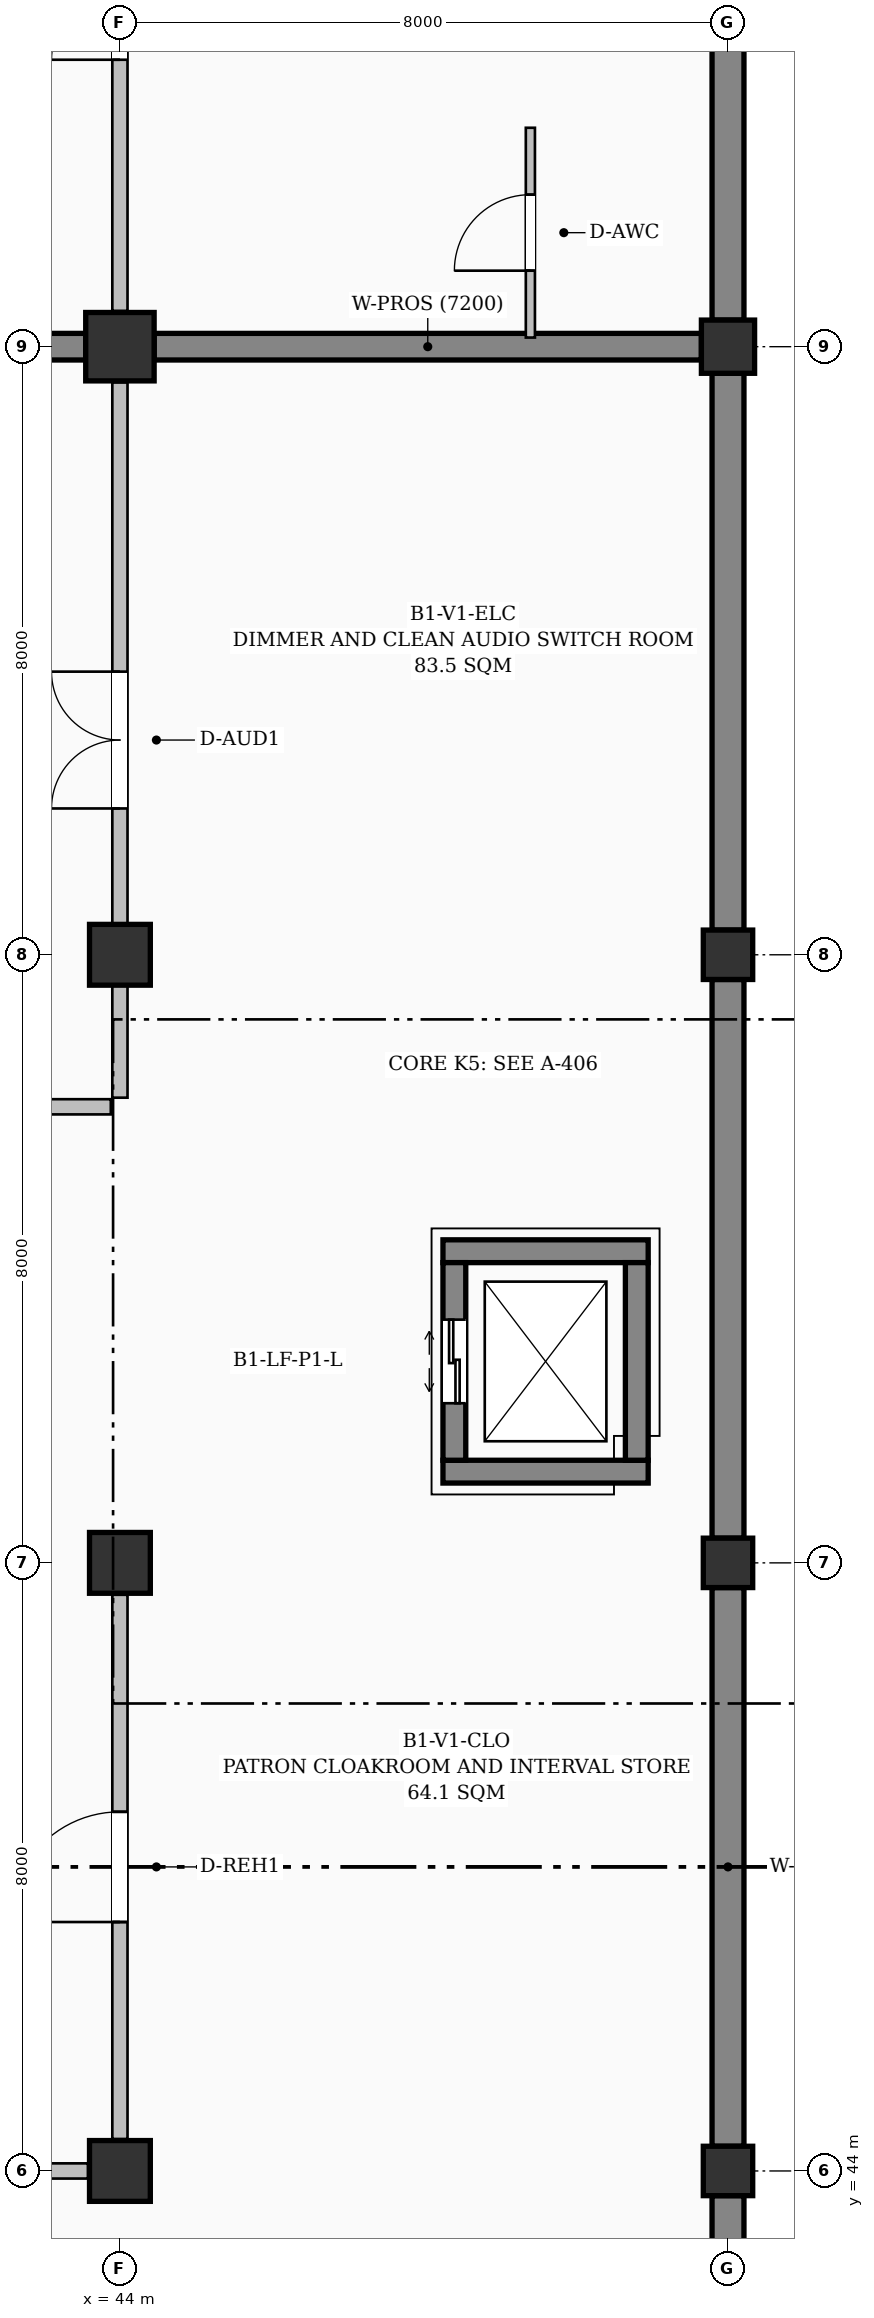
"""IFC4 building model, lengths in metres.
Left out: names, types, materials, properties, quantities, classifications, styles, units other than length and angle.
Written with IfcOpenShell. Run it as: python <this file> out.ifc"""

import sys

from ifc_helpers import new_model, si_unit, direction, frame, frame_2d, origin, origin_2d, place, context, subcontext, project, spatial, rectangle, extrude, element, fill, save


model = new_model("IFC4")
c1 = context("Model", 3, precision=1e-05, world=origin(), true_north=direction((0.0, 1.0)))
c2 = subcontext(c1, "Body", "Model", "MODEL_VIEW")
j1 = project(units=[si_unit("LENGTHUNIT", "METRE"), si_unit("PLANEANGLEUNIT", "RADIAN")], contexts=[c1])
p1 = place(None, origin())
s1 = spatial("IfcSite", under=j1, at=p1, CompositionType="ELEMENT")
p2 = place(p1, origin())
s2 = spatial("IfcBuilding", under=s1, at=p2, CompositionType="ELEMENT")
p3 = place(p2, frame((0.0, 0.0, -4.8)))
s3 = spatial("IfcBuildingStorey", under=s2, at=p3, CompositionType="ELEMENT", Elevation=-4.8)
for number, where, z_axis, x_axis in (
    (1, (44.0, 44.0, -0.38), (0.0, 0.0, 1.0), (1.0, 0.0, 0.0)),
    (2, (44.0, 52.0, -0.38), (0.0, 0.0, 1.0), (1.0, 0.0, 0.0)),
    (3, (44.0, 60.0, -0.38), (0.0, 0.0, 1.0), (1.0, 0.0, 0.0)),
):
    element("IfcColumn", number, at=place(p3, frame(where, z_axis=z_axis, x_axis=x_axis)), inside=s3, PredefinedType="COLUMN", context=c2, shape_type="SweptSolid", body=[
        extrude(rectangle(XDim=0.8, YDim=0.8, at=origin_2d()), origin(), (0.0, 0.0, 1.0), 5.18),
    ])
p4 = place(p3, frame((44.0, 68.0, -0.38), z_axis=(0.0, 0.0, 1.0), x_axis=(1.0, 0.0, 0.0)))
e4 = element("IfcColumn", 4, at=p4, inside=s3, PredefinedType="COLUMN", context=c2, shape_type="SweptSolid", body=[
    extrude(rectangle(XDim=0.9, YDim=0.9, at=origin_2d()), origin(), (0.0, 0.0, 1.0), 5.18),
])
for number, where, z_axis, x_axis in (
    (5, (52.0, 44.0, -0.38), (0.0, 0.0, 1.0), (1.0, 0.0, 0.0)),
    (6, (52.0, 52.0, -0.38), (0.0, 0.0, 1.0), (1.0, 0.0, 0.0)),
    (7, (52.0, 60.0, -0.38), (0.0, 0.0, 1.0), (1.0, 0.0, 0.0)),
):
    element("IfcColumn", number, at=place(p3, frame(where, z_axis=z_axis, x_axis=x_axis)), inside=s3, PredefinedType="COLUMN", context=c2, shape_type="SweptSolid", body=[
        extrude(rectangle(XDim=0.65, YDim=0.65, at=origin_2d()), origin(), (0.0, 0.0, 1.0), 5.18),
    ])
p5 = place(p3, frame((52.0, 68.0, -0.38), z_axis=(0.0, 0.0, 1.0), x_axis=(1.0, 0.0, 0.0)))
e8 = element("IfcColumn", 8, at=p5, inside=s3, PredefinedType="COLUMN", context=c2, shape_type="SweptSolid", body=[
    extrude(rectangle(XDim=0.7, YDim=0.7, at=origin_2d()), origin(), (0.0, 0.0, 1.0), 5.18),
])
p6 = place(p3, frame((52.0, 67.65, 0.0), z_axis=(0.0, 0.0, 1.0), x_axis=(0.0, -1.0, 0.0)))
e9 = element("IfcWall", 9, at=p6, inside=s3, PredefinedType="USERDEFINED", context=c2, shape_type="SweptSolid", body=[
    extrude(rectangle(XDim=7.325, YDim=0.42, at=frame_2d((3.663, 0.0))), origin(), (0.0, 0.0, 1.0), 3.85),
])
for number, where, z_axis, x_axis in (
    (10, (52.0, 59.675, 0.0), (0.0, 0.0, 1.0), (0.0, -1.0, 0.0)),
    (11, (52.0, 51.675, 0.0), (0.0, 0.0, 1.0), (0.0, -1.0, 0.0)),
    (12, (52.0, 43.675, 0.0), (0.0, 0.0, 1.0), (0.0, -1.0, 0.0)),
):
    element("IfcWall", number, at=place(p3, frame(where, z_axis=z_axis, x_axis=x_axis)), inside=s3, PredefinedType="USERDEFINED", context=c2, shape_type="SweptSolid", body=[
        extrude(rectangle(XDim=7.35, YDim=0.42, at=frame_2d((3.675, 0.0))), origin(), (0.0, 0.0, 1.0), 3.85),
    ])
p7 = place(p3, frame((52.0, 75.65, 0.0), z_axis=(0.0, 0.0, 1.0), x_axis=(0.0, -1.0, 0.0)))
e13 = element("IfcWall", 13, at=p7, inside=s3, PredefinedType="USERDEFINED", context=c2, shape_type="SweptSolid", body=[
    extrude(rectangle(XDim=7.3, YDim=0.42, at=frame_2d((3.65, 0.0))), origin(), (0.0, 0.0, 1.0), 3.85),
])
p8 = place(p3, frame((36.45, 68.0, 0.0), z_axis=(0.0, 0.0, 1.0), x_axis=(1.0, 0.0, 0.0)))
e14 = element("IfcWall", 14, at=p8, inside=s3, PredefinedType="SHEAR", context=c2, shape_type="SweptSolid", body=[
    extrude(rectangle(XDim=7.1, YDim=0.35, at=frame_2d((3.55, 0.0))), origin(), (0.0, 0.0, 1.0), 4.5),
])
p9 = place(p3, frame((44.45, 68.0, 0.0), z_axis=(0.0, 0.0, 1.0), x_axis=(1.0, 0.0, 0.0)))
e15 = element("IfcWall", 15, at=p9, inside=s3, PredefinedType="SHEAR", context=c2, shape_type="SweptSolid", body=[
    extrude(rectangle(XDim=7.2, YDim=0.35, at=frame_2d((3.6, 0.0))), origin(), (0.0, 0.0, 1.0), 4.5),
])
for number, where, z_axis, x_axis in (
    (16, (48.25, 53.2, -1.2), (0.0, 0.0, 1.0), (1.0, 0.0, 0.0)),
    (17, (50.95, 56.1, -1.2), (0.0, 0.0, 1.0), (-1.0, 0.0, 0.0)),
):
    element("IfcWall", number, at=place(p3, frame(where, z_axis=z_axis, x_axis=x_axis)), inside=s3, PredefinedType="SHEAR", context=c2, shape_type="SweptSolid", body=[
        extrude(rectangle(XDim=2.7, YDim=0.3, at=frame_2d((1.35, 0.0))), origin(), (0.0, 0.0, 1.0), 5.7),
    ])
p10 = place(p3, frame((48.4, 53.35, -1.2), z_axis=(0.0, 0.0, 1.0), x_axis=(0.0, 1.0, 0.0)))
e18 = element("IfcWall", 18, at=p10, inside=s3, PredefinedType="SHEAR", context=c2, shape_type="SweptSolid", body=[
    extrude(rectangle(XDim=2.6, YDim=0.3, at=frame_2d((1.3, 0.0))), origin(), (0.0, 0.0, 1.0), 5.7),
])
p11 = place(p10, frame((0.75, 0.0, 1.2)))
e19 = element("IfcOpeningElement", 19, at=p11, cuts=e18, PredefinedType="OPENING", context=c2, shape_type="SweptSolid", body=[
    extrude(rectangle(XDim=1.1, YDim=2.15, at=frame_2d((0.55, 1.075))), frame((0.0, 0.16, 0.0), z_axis=(0.0, -1.0, 0.0), x_axis=(1.0, 0.0, 0.0)), (0.0, 0.0, 1.0), 0.32),
])
p12 = place(p3, frame((50.8, 55.95, -1.2), z_axis=(0.0, 0.0, 1.0), x_axis=(0.0, -1.0, 0.0)))
e20 = element("IfcWall", 20, at=p12, inside=s3, PredefinedType="SHEAR", context=c2, shape_type="SweptSolid", body=[
    extrude(rectangle(XDim=2.6, YDim=0.3, at=frame_2d((1.3, 0.0))), origin(), (0.0, 0.0, 1.0), 5.7),
])
p13 = place(p3, frame((28.12, 58.0, 0.0), z_axis=(0.0, 0.0, 1.0), x_axis=(1.0, 0.0, 0.0)))
e21 = element("IfcWall", 21, at=p13, inside=s3, PredefinedType="PARTITIONING", context=c2, shape_type="SweptSolid", body=[
    extrude(rectangle(XDim=15.76, YDim=0.2, at=frame_2d((7.88, 0.0))), origin(), (0.0, 0.0, 1.0), 4.5),
])
p14 = place(p13, frame((6.98, 0.0, 0.0)))
e22 = element("IfcOpeningElement", 22, at=p14, cuts=e21, PredefinedType="OPENING", context=c2, shape_type="SweptSolid", body=[
    extrude(rectangle(XDim=1.8, YDim=2.35, at=frame_2d((0.9, 1.175))), frame((0.0, 0.11, 0.0), z_axis=(0.0, -1.0, 0.0), x_axis=(1.0, 0.0, 0.0)), (0.0, 0.0, 1.0), 0.22),
])
p15 = place(p3, frame((44.0, 58.12, 0.0), z_axis=(0.0, 0.0, 1.0), x_axis=(0.0, 1.0, 0.0)))
e23 = element("IfcWall", 23, at=p15, inside=s3, PredefinedType="PARTITIONING", context=c2, shape_type="SweptSolid", body=[
    extrude(rectangle(XDim=9.41, YDim=0.2, at=frame_2d((4.705, 0.0))), origin(), (0.0, 0.0, 1.0), 3.885),
])
p16 = place(p15, frame((3.805, 0.0, 0.0)))
e24 = element("IfcOpeningElement", 24, at=p16, cuts=e23, PredefinedType="OPENING", context=c2, shape_type="SweptSolid", body=[
    extrude(rectangle(XDim=1.8, YDim=2.35, at=frame_2d((0.9, 1.175))), frame((0.0, 0.11, 0.0), z_axis=(0.0, -1.0, 0.0), x_axis=(1.0, 0.0, 0.0)), (0.0, 0.0, 1.0), 0.22),
])
p17 = place(p3, frame((28.42, 44.0, 0.0), z_axis=(0.0, 0.0, 1.0), x_axis=(1.0, 0.0, 0.0)))
e25 = element("IfcWall", 25, at=p17, inside=s3, PredefinedType="PARTITIONING", context=c2, shape_type="SweptSolid", body=[
    extrude(rectangle(XDim=15.16, YDim=0.2, at=frame_2d((7.58, 0.0))), origin(), (0.0, 0.0, 1.0), 3.635),
])
p18 = place(p17, frame((5.036, 0.0, 0.0)))
e26 = element("IfcOpeningElement", 26, at=p18, cuts=e25, PredefinedType="OPENING", context=c2, shape_type="SweptSolid", body=[
    extrude(rectangle(XDim=1.45, YDim=2.25, at=frame_2d((0.725, 1.125))), frame((0.0, 0.11, 0.0), z_axis=(0.0, -1.0, 0.0), x_axis=(1.0, 0.0, 0.0)), (0.0, 0.0, 1.0), 0.22),
])
p19 = place(p3, frame((44.0, 44.42, 0.0), z_axis=(0.0, 0.0, 1.0), x_axis=(0.0, 1.0, 0.0)))
e27 = element("IfcWall", 27, at=p19, inside=s3, PredefinedType="PARTITIONING", context=c2, shape_type="SweptSolid", body=[
    extrude(rectangle(XDim=7.16, YDim=0.2, at=frame_2d((3.58, 0.0))), origin(), (0.0, 0.0, 1.0), 4.035),
])
p20 = place(p19, frame((2.855, 0.0, 0.0)))
e28 = element("IfcOpeningElement", 28, at=p20, cuts=e27, PredefinedType="OPENING", context=c2, shape_type="SweptSolid", body=[
    extrude(rectangle(XDim=1.45, YDim=2.25, at=frame_2d((0.725, 1.125))), frame((0.0, 0.11, 0.0), z_axis=(0.0, -1.0, 0.0), x_axis=(1.0, 0.0, 0.0)), (0.0, 0.0, 1.0), 0.22),
])
p21 = place(p3, frame((44.0, 68.47, 0.0), z_axis=(0.0, 0.0, 1.0), x_axis=(0.0, 1.0, 0.0)))
e29 = element("IfcWall", 29, at=p21, inside=s3, PredefinedType="PARTITIONING", context=c2, shape_type="SweptSolid", body=[
    extrude(rectangle(XDim=8.41, YDim=0.2, at=frame_2d((4.205, 0.0))), origin(), (0.0, 0.0, 1.0), 4.095),
])
p22 = place(p21, frame((3.305, 0.0, 0.0)))
e30 = element("IfcOpeningElement", 30, at=p22, cuts=e29, PredefinedType="OPENING", context=c2, shape_type="SweptSolid", body=[
    extrude(rectangle(XDim=1.8, YDim=2.35, at=frame_2d((0.9, 1.175))), frame((0.0, 0.11, 0.0), z_axis=(0.0, -1.0, 0.0), x_axis=(1.0, 0.0, 0.0)), (0.0, 0.0, 1.0), 0.22),
])
p23 = place(p3, frame((49.4, 68.12, 0.0), z_axis=(0.0, 0.0, 1.0), x_axis=(0.0, 1.0, 0.0)))
e31 = element("IfcWall", 31, at=p23, inside=s3, PredefinedType="PARTITIONING", context=c2, shape_type="SweptSolid", body=[
    extrude(rectangle(XDim=2.76, YDim=0.12, at=frame_2d((1.38, 0.0))), origin(), (0.0, 0.0, 1.0), 4.5),
])
p24 = place(p23, frame((0.88, 0.0, 0.0)))
e32 = element("IfcOpeningElement", 32, at=p24, cuts=e31, PredefinedType="OPENING", context=c2, shape_type="SweptSolid", body=[
    extrude(rectangle(XDim=1.0, YDim=2.1, at=frame_2d((0.5, 1.05))), frame((0.0, 0.07, 0.0), z_axis=(0.0, -1.0, 0.0), x_axis=(1.0, 0.0, 0.0)), (0.0, 0.0, 1.0), 0.14),
])
p25 = place(p11, origin())
e33 = element("IfcDoor", 33, at=p25, inside=s3, OperationType="DOUBLE_DOOR_SLIDING", PredefinedType="DOOR", context=c2, shape_type="SweptSolid", body=[
    extrude(rectangle(XDim=1.1, YDim=2.15, at=frame_2d((0.55, 1.075))), frame((0.0, 0.025, 0.0), z_axis=(0.0, -1.0, 0.0), x_axis=(1.0, 0.0, 0.0)), (0.0, 0.0, 1.0), 0.05),
])
fill(e19, e33)
p26 = place(p16, origin())
e34 = element("IfcDoor", 34, at=p26, inside=s3, OperationType="DOUBLE_DOOR_SINGLE_SWING", PredefinedType="DOOR", context=c2, shape_type="SweptSolid", body=[
    extrude(rectangle(XDim=1.8, YDim=2.35, at=frame_2d((0.9, 1.175))), frame((0.0, 0.025, 0.0), z_axis=(0.0, -1.0, 0.0), x_axis=(1.0, 0.0, 0.0)), (0.0, 0.0, 1.0), 0.05),
])
fill(e24, e34)
p27 = place(p20, origin())
e35 = element("IfcDoor", 35, at=p27, inside=s3, OperationType="SINGLE_SWING_LEFT", PredefinedType="DOOR", context=c2, shape_type="SweptSolid", body=[
    extrude(rectangle(XDim=1.45, YDim=2.25, at=frame_2d((0.725, 1.125))), frame((0.0, 0.025, 0.0), z_axis=(0.0, -1.0, 0.0), x_axis=(1.0, 0.0, 0.0)), (0.0, 0.0, 1.0), 0.05),
])
fill(e28, e35)
p28 = place(p22, origin())
e36 = element("IfcDoor", 36, at=p28, inside=s3, OperationType="DOUBLE_DOOR_SINGLE_SWING", PredefinedType="DOOR", context=c2, shape_type="SweptSolid", body=[
    extrude(rectangle(XDim=1.8, YDim=2.35, at=frame_2d((0.9, 1.175))), frame((0.0, 0.025, 0.0), z_axis=(0.0, -1.0, 0.0), x_axis=(1.0, 0.0, 0.0)), (0.0, 0.0, 1.0), 0.05),
])
fill(e30, e36)
p29 = place(p24, origin())
e37 = element("IfcDoor", 37, at=p29, inside=s3, OperationType="SINGLE_SWING_LEFT", PredefinedType="DOOR", context=c2, shape_type="SweptSolid", body=[
    extrude(rectangle(XDim=1.0, YDim=2.1, at=frame_2d((0.5, 1.05))), frame((0.0, 0.025, 0.0), z_axis=(0.0, -1.0, 0.0), x_axis=(1.0, 0.0, 0.0)), (0.0, 0.0, 1.0), 0.05),
])
fill(e32, e37)
save(model, sys.argv[1])
